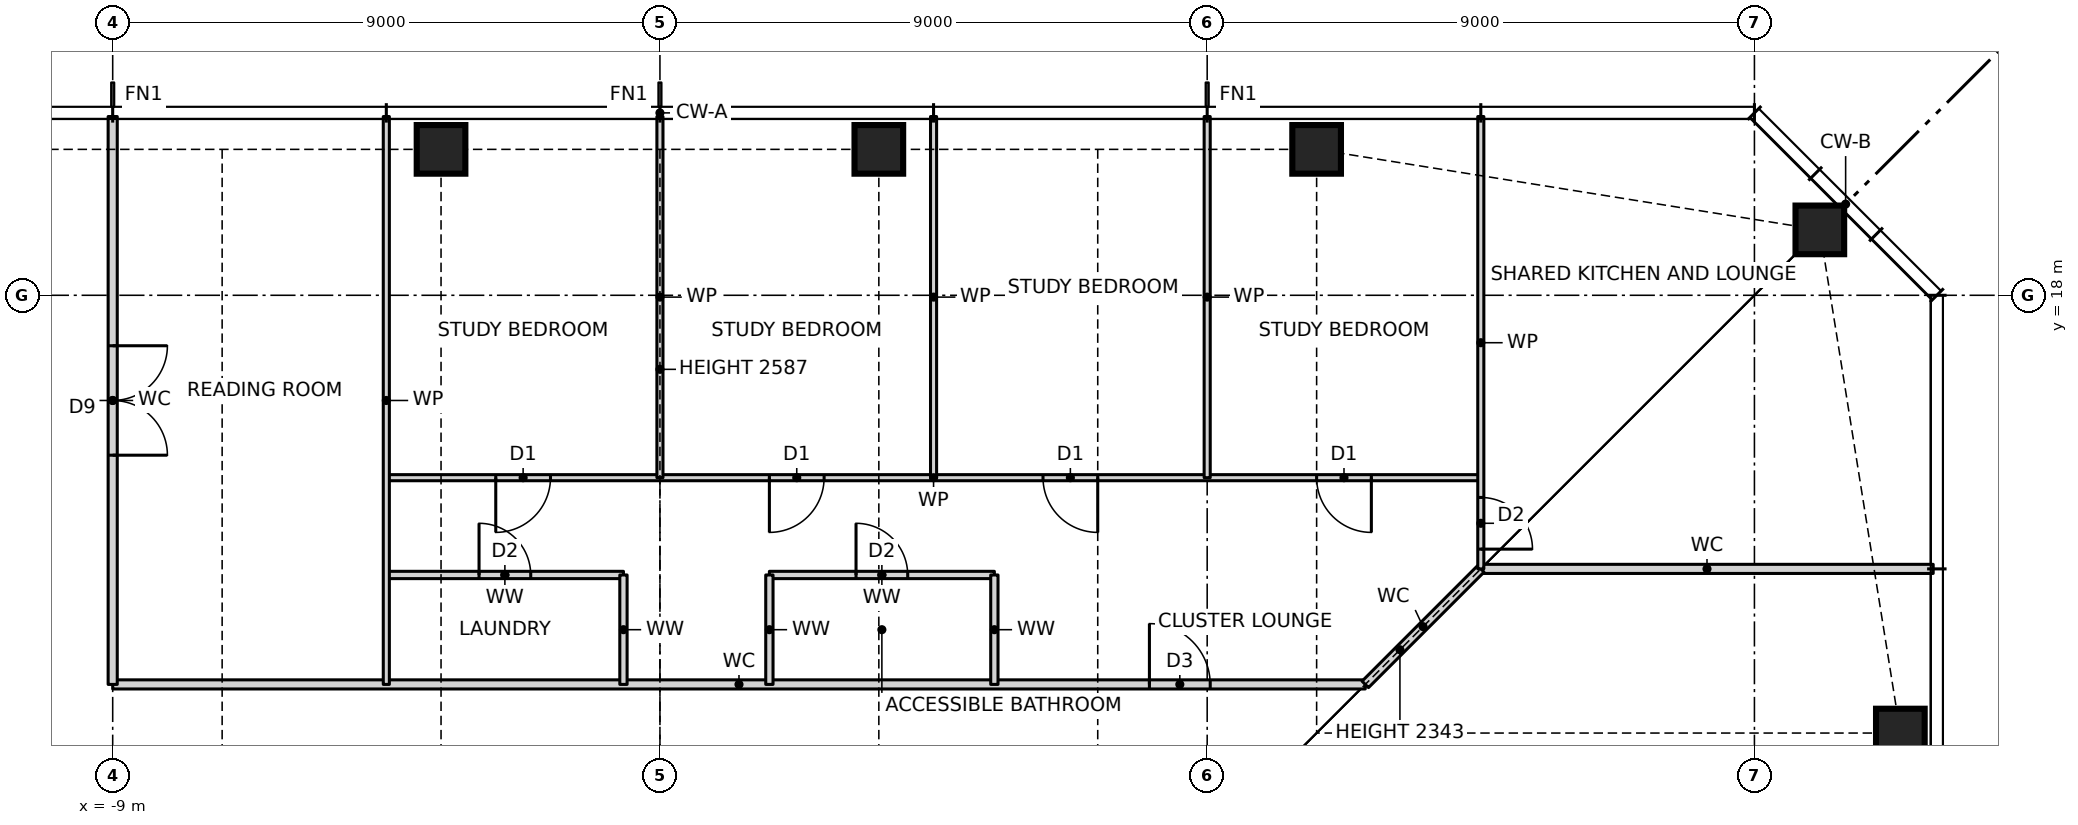
"""IFC4 building model, lengths in metres.
Left out: names, types, materials, properties, quantities, classifications, styles, units other than length and angle.
Written with IfcOpenShell. Run it as: python <this file> out.ifc"""

import sys

from ifc_helpers import new_model, si_unit, direction, frame, frame_2d, origin, origin_2d, place, context, subcontext, project, spatial, rectangle, hollow_rectangle, extrude, element, fill, save


model = new_model("IFC4")
c1 = context("Model", 3, precision=1e-05, world=origin(), true_north=direction((0.0, 1.0)))
c2 = subcontext(c1, "Body", "Model", "MODEL_VIEW")
j1 = project(units=[si_unit("LENGTHUNIT", "METRE"), si_unit("PLANEANGLEUNIT", "RADIAN")], contexts=[c1])
p1 = place(None, origin())
s1 = spatial("IfcSite", under=j1, at=p1, CompositionType="ELEMENT")
p2 = place(p1, origin())
s2 = spatial("IfcBuilding", under=s1, at=p2, CompositionType="ELEMENT")
p3 = place(p2, frame((0.0, 0.0, 133.0)))
s3 = spatial("IfcBuildingStorey", under=s2, at=p3, CompositionType="ELEMENT", Elevation=133.0)
for number, where, z_axis, x_axis in (
    (1, (20.4, 10.8, 0.0), (0.0, 0.0, 1.0), (1.0, 0.0, 0.0)),
    (2, (19.076, 19.076, 0.0), (0.0, 0.0, 1.0), (1.0, 0.0, 0.0)),
    (3, (10.8, 20.4, 0.0), (0.0, 0.0, 1.0), (1.0, 0.0, 0.0)),
    (4, (3.6, 20.4, 0.0), (0.0, 0.0, 1.0), (1.0, 0.0, 0.0)),
    (5, (-3.6, 20.4, 0.0), (0.0, 0.0, 1.0), (1.0, 0.0, 0.0)),
):
    element("IfcColumn", number, at=place(p3, frame(where, z_axis=z_axis, x_axis=x_axis)), inside=s3, PredefinedType="COLUMN", context=c2, shape_type="SweptSolid", body=[
        extrude(hollow_rectangle(XDim=0.8, YDim=0.8, WallThickness=0.07, at=origin_2d()), origin(), (0.0, 0.0, 1.0), 3.5),
    ])
p4 = place(p3, frame((-9.0, 11.6, 0.0), z_axis=(0.0, 0.0, 1.0), x_axis=(1.0, 0.0, 0.0)))
e6 = element("IfcWall", 6, at=p4, inside=s3, PredefinedType="PARTITIONING", context=c2, shape_type="SweptSolid", body=[
    extrude(rectangle(XDim=20.6, YDim=0.15, at=frame_2d((10.3, 0.0))), origin(), (0.0, 0.0, 1.0), 3.27),
])
p5 = place(p4, frame((17.05, 0.0, 0.0)))
e7 = element("IfcOpeningElement", 7, at=p5, cuts=e6, PredefinedType="OPENING", context=c2, shape_type="SweptSolid", body=[
    extrude(rectangle(XDim=1.0, YDim=2.1, at=frame_2d((0.5, 1.05))), frame((0.0, 0.085, 0.0), z_axis=(0.0, -1.0, 0.0), x_axis=(1.0, 0.0, 0.0)), (0.0, 0.0, 1.0), 0.17),
])
p6 = place(p3, frame((-4.5, 13.4, 0.0), z_axis=(0.0, 0.0, 1.0), x_axis=(1.0, 0.0, 0.0)))
e8 = element("IfcWall", 8, at=p6, inside=s3, PredefinedType="PARTITIONING", context=c2, shape_type="SweptSolid", body=[
    extrude(rectangle(XDim=3.9, YDim=0.12, at=frame_2d((1.95, 0.0))), origin(), (0.0, 0.0, 1.0), 3.27),
])
p7 = place(p6, frame((1.525, 0.0, 0.0)))
e9 = element("IfcOpeningElement", 9, at=p7, cuts=e8, PredefinedType="OPENING", context=c2, shape_type="SweptSolid", body=[
    extrude(rectangle(XDim=0.85, YDim=2.1, at=frame_2d((0.425, 1.05))), frame((0.0, 0.07, 0.0), z_axis=(0.0, -1.0, 0.0), x_axis=(1.0, 0.0, 0.0)), (0.0, 0.0, 1.0), 0.14),
])
p8 = place(p3, frame((1.8, 13.4, 0.0), z_axis=(0.0, 0.0, 1.0), x_axis=(1.0, 0.0, 0.0)))
e10 = element("IfcWall", 10, at=p8, inside=s3, PredefinedType="PARTITIONING", context=c2, shape_type="SweptSolid", body=[
    extrude(rectangle(XDim=3.7, YDim=0.12, at=frame_2d((1.85, 0.0))), origin(), (0.0, 0.0, 1.0), 3.27),
])
p9 = place(p8, frame((1.425, 0.0, 0.0)))
e11 = element("IfcOpeningElement", 11, at=p9, cuts=e10, PredefinedType="OPENING", context=c2, shape_type="SweptSolid", body=[
    extrude(rectangle(XDim=0.85, YDim=2.1, at=frame_2d((0.425, 1.05))), frame((0.0, 0.07, 0.0), z_axis=(0.0, -1.0, 0.0), x_axis=(1.0, 0.0, 0.0)), (0.0, 0.0, 1.0), 0.14),
])
p10 = place(p3, frame((13.5, 13.5, 0.0), z_axis=(0.0, 0.0, 1.0), x_axis=(1.0, 0.0, 0.0)))
e12 = element("IfcWall", 12, at=p10, inside=s3, PredefinedType="PARTITIONING", context=c2, shape_type="SweptSolid", body=[
    extrude(rectangle(XDim=7.44, YDim=0.15, at=frame_2d((3.72, 0.0))), origin(), (0.0, 0.0, 1.0), 3.27),
])
p11 = place(p3, frame((-4.5, 15.0, 0.0), z_axis=(0.0, 0.0, 1.0), x_axis=(1.0, 0.0, 0.0)))
e13 = element("IfcWall", 13, at=p11, inside=s3, PredefinedType="PARTITIONING", context=c2, shape_type="SweptSolid", body=[
    extrude(rectangle(XDim=18.0, YDim=0.1, at=frame_2d((9.0, 0.0))), origin(), (0.0, 0.0, 1.0), 3.27),
])
p12 = place(p11, frame((15.3, 0.0, 0.0)))
e14 = element("IfcOpeningElement", 14, at=p12, cuts=e13, PredefinedType="OPENING", context=c2, shape_type="SweptSolid", body=[
    extrude(rectangle(XDim=0.9, YDim=2.1, at=frame_2d((0.45, 1.05))), frame((0.0, 0.06, 0.0), z_axis=(0.0, -1.0, 0.0), x_axis=(1.0, 0.0, 0.0)), (0.0, 0.0, 1.0), 0.12),
])
p13 = place(p11, frame((10.8, 0.0, 0.0)))
e15 = element("IfcOpeningElement", 15, at=p13, cuts=e13, PredefinedType="OPENING", context=c2, shape_type="SweptSolid", body=[
    extrude(rectangle(XDim=0.9, YDim=2.1, at=frame_2d((0.45, 1.05))), frame((0.0, 0.06, 0.0), z_axis=(0.0, -1.0, 0.0), x_axis=(1.0, 0.0, 0.0)), (0.0, 0.0, 1.0), 0.12),
])
p14 = place(p11, frame((6.3, 0.0, 0.0)))
e16 = element("IfcOpeningElement", 16, at=p14, cuts=e13, PredefinedType="OPENING", context=c2, shape_type="SweptSolid", body=[
    extrude(rectangle(XDim=0.9, YDim=2.1, at=frame_2d((0.45, 1.05))), frame((0.0, 0.06, 0.0), z_axis=(0.0, -1.0, 0.0), x_axis=(1.0, 0.0, 0.0)), (0.0, 0.0, 1.0), 0.12),
])
p15 = place(p11, frame((1.8, 0.0, 0.0)))
e17 = element("IfcOpeningElement", 17, at=p15, cuts=e13, PredefinedType="OPENING", context=c2, shape_type="SweptSolid", body=[
    extrude(rectangle(XDim=0.9, YDim=2.1, at=frame_2d((0.45, 1.05))), frame((0.0, 0.06, 0.0), z_axis=(0.0, -1.0, 0.0), x_axis=(1.0, 0.0, 0.0)), (0.0, 0.0, 1.0), 0.12),
])
p16 = place(p3, frame((11.6, 11.6, 0.0), z_axis=(0.0, 0.0, 1.0), x_axis=(0.707106781187, 0.707106781187, 0.0)))
e18 = element("IfcWall", 18, at=p16, inside=s3, PredefinedType="PARTITIONING", context=c2, shape_type="SweptSolid", body=[
    extrude(rectangle(XDim=2.687, YDim=0.15, at=frame_2d((1.343, 0.0))), origin(), (0.0, 0.0, 1.0), 2.343),
])
p17 = place(p3, frame((13.5, 13.5, 0.0), z_axis=(0.0, 0.0, 1.0), x_axis=(0.0, 1.0, 0.0)))
e19 = element("IfcWall", 19, at=p17, inside=s3, PredefinedType="PARTITIONING", context=c2, shape_type="SweptSolid", body=[
    extrude(rectangle(XDim=7.44, YDim=0.1, at=frame_2d((3.72, 0.0))), origin(), (0.0, 0.0, 1.0), 3.27),
])
p18 = place(p17, frame((0.325, 0.0, 0.0)))
e20 = element("IfcOpeningElement", 20, at=p18, cuts=e19, PredefinedType="OPENING", context=c2, shape_type="SweptSolid", body=[
    extrude(rectangle(XDim=0.85, YDim=2.1, at=frame_2d((0.425, 1.05))), frame((0.0, 0.06, 0.0), z_axis=(0.0, -1.0, 0.0), x_axis=(1.0, 0.0, 0.0)), (0.0, 0.0, 1.0), 0.12),
])
p19 = place(p3, frame((9.0, 15.0, 0.0), z_axis=(0.0, 0.0, 1.0), x_axis=(0.0, 1.0, 0.0)))
e21 = element("IfcWall", 21, at=p19, inside=s3, PredefinedType="PARTITIONING", context=c2, shape_type="SweptSolid", body=[
    extrude(rectangle(XDim=5.94, YDim=0.1, at=frame_2d((2.97, 0.0))), origin(), (0.0, 0.0, 1.0), 3.27),
])
p20 = place(p3, frame((5.5, 11.6, 0.0), z_axis=(0.0, 0.0, 1.0), x_axis=(0.0, 1.0, 0.0)))
e22 = element("IfcWall", 22, at=p20, inside=s3, PredefinedType="PARTITIONING", context=c2, shape_type="SweptSolid", body=[
    extrude(rectangle(XDim=1.8, YDim=0.12, at=frame_2d((0.9, 0.0))), origin(), (0.0, 0.0, 1.0), 3.27),
])
p21 = place(p3, frame((4.5, 15.0, 0.0), z_axis=(0.0, 0.0, 1.0), x_axis=(0.0, 1.0, 0.0)))
e23 = element("IfcWall", 23, at=p21, inside=s3, PredefinedType="PARTITIONING", context=c2, shape_type="SweptSolid", body=[
    extrude(rectangle(XDim=5.94, YDim=0.1, at=frame_2d((2.97, 0.0))), origin(), (0.0, 0.0, 1.0), 3.27),
])
p22 = place(p3, frame((1.8, 11.6, 0.0), z_axis=(0.0, 0.0, 1.0), x_axis=(0.0, 1.0, 0.0)))
e24 = element("IfcWall", 24, at=p22, inside=s3, PredefinedType="PARTITIONING", context=c2, shape_type="SweptSolid", body=[
    extrude(rectangle(XDim=1.8, YDim=0.12, at=frame_2d((0.9, 0.0))), origin(), (0.0, 0.0, 1.0), 3.27),
])
p23 = place(p3, frame((0.0, 15.0, 0.0), z_axis=(0.0, 0.0, 1.0), x_axis=(0.0, 1.0, 0.0)))
e25 = element("IfcWall", 25, at=p23, inside=s3, PredefinedType="PARTITIONING", context=c2, shape_type="SweptSolid", body=[
    extrude(rectangle(XDim=5.94, YDim=0.1, at=frame_2d((2.97, 0.0))), origin(), (0.0, 0.0, 1.0), 2.587),
])
p24 = place(p3, frame((-0.6, 11.6, 0.0), z_axis=(0.0, 0.0, 1.0), x_axis=(0.0, 1.0, 0.0)))
e26 = element("IfcWall", 26, at=p24, inside=s3, PredefinedType="PARTITIONING", context=c2, shape_type="SweptSolid", body=[
    extrude(rectangle(XDim=1.8, YDim=0.12, at=frame_2d((0.9, 0.0))), origin(), (0.0, 0.0, 1.0), 3.27),
])
p25 = place(p3, frame((-4.5, 11.6, 0.0), z_axis=(0.0, 0.0, 1.0), x_axis=(0.0, 1.0, 0.0)))
e27 = element("IfcWall", 27, at=p25, inside=s3, PredefinedType="PARTITIONING", context=c2, shape_type="SweptSolid", body=[
    extrude(rectangle(XDim=9.34, YDim=0.1, at=frame_2d((4.67, 0.0))), origin(), (0.0, 0.0, 1.0), 3.27),
])
p26 = place(p3, frame((-9.0, 11.6, 0.0), z_axis=(0.0, 0.0, 1.0), x_axis=(0.0, 1.0, 0.0)))
e28 = element("IfcWall", 28, at=p26, inside=s3, PredefinedType="PARTITIONING", context=c2, shape_type="SweptSolid", body=[
    extrude(rectangle(XDim=9.34, YDim=0.15, at=frame_2d((4.67, 0.0))), origin(), (0.0, 0.0, 1.0), 3.27),
])
p27 = place(p26, frame((3.77, 0.0, 0.0)))
e29 = element("IfcOpeningElement", 29, at=p27, cuts=e28, PredefinedType="OPENING", context=c2, shape_type="SweptSolid", body=[
    extrude(rectangle(XDim=1.8, YDim=2.1, at=frame_2d((0.9, 1.05))), frame((0.0, 0.085, 0.0), z_axis=(0.0, -1.0, 0.0), x_axis=(1.0, 0.0, 0.0)), (0.0, 0.0, 1.0), 0.17),
])
p28 = place(p12, frame((0.9, 0.0, 0.0), z_axis=(0.0, 0.0, 1.0), x_axis=(-1.0, 0.0, 0.0)))
e30 = element("IfcDoor", 30, at=p28, inside=s3, OperationType="SINGLE_SWING_LEFT", PredefinedType="DOOR", context=c2, shape_type="SweptSolid", body=[
    extrude(rectangle(XDim=0.9, YDim=2.1, at=frame_2d((0.45, 1.05))), frame((0.0, 0.025, 0.0), z_axis=(0.0, -1.0, 0.0), x_axis=(1.0, 0.0, 0.0)), (0.0, 0.0, 1.0), 0.05),
])
fill(e14, e30)
p29 = place(p13, frame((0.9, 0.0, 0.0), z_axis=(0.0, 0.0, 1.0), x_axis=(-1.0, 0.0, 0.0)))
e31 = element("IfcDoor", 31, at=p29, inside=s3, OperationType="SINGLE_SWING_LEFT", PredefinedType="DOOR", context=c2, shape_type="SweptSolid", body=[
    extrude(rectangle(XDim=0.9, YDim=2.1, at=frame_2d((0.45, 1.05))), frame((0.0, 0.025, 0.0), z_axis=(0.0, -1.0, 0.0), x_axis=(1.0, 0.0, 0.0)), (0.0, 0.0, 1.0), 0.05),
])
fill(e15, e31)
p30 = place(p14, frame((0.9, 0.0, 0.0), z_axis=(0.0, 0.0, 1.0), x_axis=(-1.0, 0.0, 0.0)))
e32 = element("IfcDoor", 32, at=p30, inside=s3, OperationType="SINGLE_SWING_RIGHT", PredefinedType="DOOR", context=c2, shape_type="SweptSolid", body=[
    extrude(rectangle(XDim=0.9, YDim=2.1, at=frame_2d((0.45, 1.05))), frame((0.0, 0.025, 0.0), z_axis=(0.0, -1.0, 0.0), x_axis=(1.0, 0.0, 0.0)), (0.0, 0.0, 1.0), 0.05),
])
fill(e16, e32)
p31 = place(p15, frame((0.9, 0.0, 0.0), z_axis=(0.0, 0.0, 1.0), x_axis=(-1.0, 0.0, 0.0)))
e33 = element("IfcDoor", 33, at=p31, inside=s3, OperationType="SINGLE_SWING_RIGHT", PredefinedType="DOOR", context=c2, shape_type="SweptSolid", body=[
    extrude(rectangle(XDim=0.9, YDim=2.1, at=frame_2d((0.45, 1.05))), frame((0.0, 0.025, 0.0), z_axis=(0.0, -1.0, 0.0), x_axis=(1.0, 0.0, 0.0)), (0.0, 0.0, 1.0), 0.05),
])
fill(e17, e33)
p32 = place(p5, origin())
e34 = element("IfcDoor", 34, at=p32, inside=s3, OperationType="SINGLE_SWING_LEFT", PredefinedType="DOOR", context=c2, shape_type="SweptSolid", body=[
    extrude(rectangle(XDim=1.0, YDim=2.1, at=frame_2d((0.5, 1.05))), frame((0.0, 0.025, 0.0), z_axis=(0.0, -1.0, 0.0), x_axis=(1.0, 0.0, 0.0)), (0.0, 0.0, 1.0), 0.05),
])
fill(e7, e34)
p33 = place(p9, origin())
e35 = element("IfcDoor", 35, at=p33, inside=s3, OperationType="SINGLE_SWING_LEFT", PredefinedType="DOOR", context=c2, shape_type="SweptSolid", body=[
    extrude(rectangle(XDim=0.85, YDim=2.1, at=frame_2d((0.425, 1.05))), frame((0.0, 0.025, 0.0), z_axis=(0.0, -1.0, 0.0), x_axis=(1.0, 0.0, 0.0)), (0.0, 0.0, 1.0), 0.05),
])
fill(e11, e35)
p34 = place(p7, origin())
e36 = element("IfcDoor", 36, at=p34, inside=s3, OperationType="SINGLE_SWING_LEFT", PredefinedType="DOOR", context=c2, shape_type="SweptSolid", body=[
    extrude(rectangle(XDim=0.85, YDim=2.1, at=frame_2d((0.425, 1.05))), frame((0.0, 0.025, 0.0), z_axis=(0.0, -1.0, 0.0), x_axis=(1.0, 0.0, 0.0)), (0.0, 0.0, 1.0), 0.05),
])
fill(e9, e36)
p35 = place(p27, frame((1.8, 0.0, 0.0), z_axis=(0.0, 0.0, 1.0), x_axis=(-1.0, 0.0, 0.0)))
e37 = element("IfcDoor", 37, at=p35, inside=s3, OperationType="DOUBLE_DOOR_SINGLE_SWING", PredefinedType="DOOR", context=c2, shape_type="SweptSolid", body=[
    extrude(rectangle(XDim=1.8, YDim=2.1, at=frame_2d((0.9, 1.05))), frame((0.0, 0.025, 0.0), z_axis=(0.0, -1.0, 0.0), x_axis=(1.0, 0.0, 0.0)), (0.0, 0.0, 1.0), 0.05),
])
fill(e29, e37)
p36 = place(p18, frame((0.85, 0.0, 0.0), z_axis=(0.0, 0.0, 1.0), x_axis=(-1.0, 0.0, 0.0)))
e38 = element("IfcDoor", 38, at=p36, inside=s3, OperationType="SINGLE_SWING_RIGHT", PredefinedType="DOOR", context=c2, shape_type="SweptSolid", body=[
    extrude(rectangle(XDim=0.85, YDim=2.1, at=frame_2d((0.425, 1.05))), frame((0.0, 0.025, 0.0), z_axis=(0.0, -1.0, 0.0), x_axis=(1.0, 0.0, 0.0)), (0.0, 0.0, 1.0), 0.05),
])
fill(e20, e38)
save(model, sys.argv[1])
